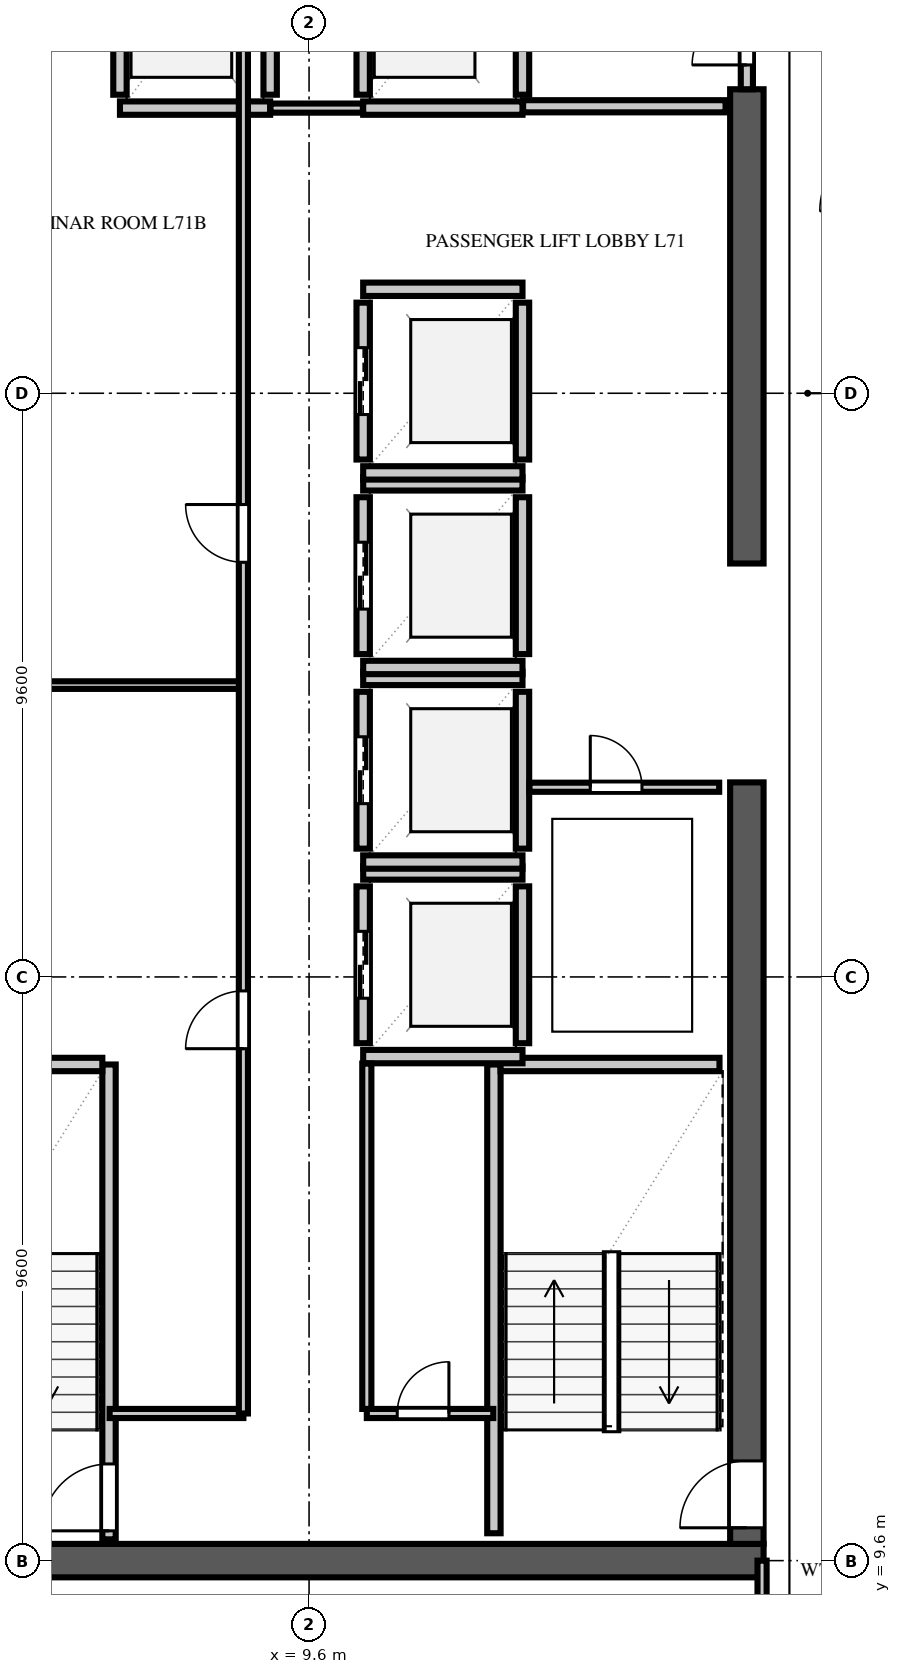
"""IFC4 building model, lengths in metres.
Left out: names, types, materials, properties, quantities, classifications, styles, units other than length and angle.
Written with IfcOpenShell. Run it as: python <this file> out.ifc"""

import sys

from ifc_helpers import new_model, si_unit, direction, frame, frame_2d, origin, place, context, subcontext, project, spatial, rectangle, extrude, element, fill, save


model = new_model("IFC4")
c1 = context("Model", 3, precision=1e-05, world=origin(), true_north=direction((0.0, 1.0)))
c2 = subcontext(c1, "Body", "Model", "MODEL_VIEW")
j1 = project(units=[si_unit("LENGTHUNIT", "METRE"), si_unit("PLANEANGLEUNIT", "RADIAN")], contexts=[c1])
p1 = place(None, origin())
s1 = spatial("IfcSite", under=j1, at=p1, CompositionType="ELEMENT")
p2 = place(p1, origin())
s2 = spatial("IfcBuilding", under=s1, at=p2, CompositionType="ELEMENT")
p3 = place(p2, frame((0.0, 0.0, 281.0)))
s3 = spatial("IfcBuildingStorey", under=s2, at=p3, CompositionType="ELEMENT", Elevation=281.0)
p4 = place(p3, frame((2.475, 9.6, 0.0), z_axis=(0.0, 0.0, 1.0), x_axis=(1.0, 0.0, 0.0)))
e1 = element("IfcWall", 1, at=p4, inside=s3, PredefinedType="SHEAR", context=c2, shape_type="SweptSolid", body=[
    extrude(rectangle(XDim=14.6, YDim=0.55, at=frame_2d((7.3, 0.0))), origin(), (0.0, 0.0, 1.0), 3.54),
])
p5 = place(p3, frame((16.8, 9.875, 0.0), z_axis=(0.0, 0.0, 1.0), x_axis=(0.0, 1.0, 0.0)))
e2 = element("IfcWall", 2, at=p5, inside=s3, PredefinedType="SHEAR", context=c2, shape_type="SweptSolid", body=[
    extrude(rectangle(XDim=12.525, YDim=0.55, at=frame_2d((6.262, 0.0))), origin(), (0.0, 0.0, 1.0), 3.54),
])
p6 = place(p5, frame((0.265, 0.0, 0.0)))
e3 = element("IfcOpeningElement", 3, at=p6, cuts=e2, PredefinedType="OPENING", context=c2, shape_type="SweptSolid", body=[
    extrude(rectangle(XDim=1.1, YDim=2.2, at=frame_2d((0.55, 1.1))), frame((0.0, 0.287, 0.0), z_axis=(0.0, -1.0, 0.0), x_axis=(1.0, 0.0, 0.0)), (0.0, 0.0, 1.0), 0.574),
])
p7 = place(p3, frame((16.8, 26.0, 0.0), z_axis=(0.0, 0.0, 1.0), x_axis=(0.0, 1.0, 0.0)))
e4 = element("IfcWall", 4, at=p7, inside=s3, PredefinedType="SHEAR", context=c2, shape_type="SweptSolid", body=[
    extrude(rectangle(XDim=7.8, YDim=0.55, at=frame_2d((3.9, 0.0))), origin(), (0.0, 0.0, 1.0), 3.54),
])
p8 = place(p3, frame((6.31, 9.95, 0.0), z_axis=(0.0, 0.0, 1.0), x_axis=(0.0, 1.0, 0.0)))
e5 = element("IfcWall", 5, at=p8, inside=s3, PredefinedType="SOLIDWALL", context=c2, shape_type="SweptSolid", body=[
    extrude(rectangle(XDim=7.81, YDim=0.22, at=frame_2d((3.905, 0.0))), origin(), (0.0, 0.0, 1.0), 3.54),
])
p9 = place(p8, frame((0.14, 0.0, 0.0)))
e6 = element("IfcOpeningElement", 6, at=p9, cuts=e5, PredefinedType="OPENING", context=c2, shape_type="SweptSolid", body=[
    extrude(rectangle(XDim=1.1, YDim=2.2, at=frame_2d((0.55, 1.1))), frame((0.0, 0.122, 0.0), z_axis=(0.0, -1.0, 0.0), x_axis=(1.0, 0.0, 0.0)), (0.0, 0.0, 1.0), 0.244),
])
p10 = place(p3, frame((2.65, 17.76, 0.0), z_axis=(0.0, 0.0, 1.0), x_axis=(1.0, 0.0, 0.0)))
e7 = element("IfcWall", 7, at=p10, inside=s3, PredefinedType="SOLIDWALL", context=c2, shape_type="SweptSolid", body=[
    extrude(rectangle(XDim=3.55, YDim=0.22, at=frame_2d((1.775, 0.0))), origin(), (0.0, 0.0, 1.0), 3.54),
])
p11 = place(p3, frame((12.64, 10.05, 0.0), z_axis=(0.0, 0.0, 1.0), x_axis=(0.0, 1.0, 0.0)))
e8 = element("IfcWall", 8, at=p11, inside=s3, PredefinedType="SOLIDWALL", context=c2, shape_type="SweptSolid", body=[
    extrude(rectangle(XDim=7.71, YDim=0.22, at=frame_2d((3.855, 0.0))), origin(), (0.0, 0.0, 1.0), 3.54),
])
p12 = place(p3, frame((12.75, 17.76, 0.0), z_axis=(0.0, 0.0, 1.0), x_axis=(1.0, 0.0, 0.0)))
e9 = element("IfcWall", 9, at=p12, inside=s3, PredefinedType="SOLIDWALL", context=c2, shape_type="SweptSolid", body=[
    extrude(rectangle(XDim=3.6, YDim=0.22, at=frame_2d((1.8, 0.0))), origin(), (0.0, 0.0, 1.0), 3.54),
])
p13 = place(p3, frame((10.49, 18.11, 0.0), z_axis=(0.0, 0.0, 1.0), x_axis=(0.0, 1.0, 0.0)))
e10 = element("IfcWall", 10, at=p13, inside=s3, PredefinedType="SOLIDWALL", context=c2, shape_type="SweptSolid", body=[
    extrude(rectangle(XDim=2.58, YDim=0.22, at=frame_2d((1.29, 0.0))), origin(), (0.0, 0.0, 1.0), 3.54),
])
p14 = place(p13, frame((0.74, 0.0, 0.0)))
e11 = element("IfcOpeningElement", 11, at=p14, cuts=e10, PredefinedType="OPENING", context=c2, shape_type="SweptSolid", body=[
    extrude(rectangle(XDim=1.1, YDim=2.2, at=frame_2d((0.55, 1.1))), frame((0.0, 0.122, 0.0), z_axis=(0.0, -1.0, 0.0), x_axis=(1.0, 0.0, 0.0)), (0.0, 0.0, 1.0), 0.244),
])
p15 = place(p3, frame((13.11, 18.11, 0.0), z_axis=(0.0, 0.0, 1.0), x_axis=(0.0, 1.0, 0.0)))
e12 = element("IfcWall", 12, at=p15, inside=s3, PredefinedType="SOLIDWALL", context=c2, shape_type="SweptSolid", body=[
    extrude(rectangle(XDim=2.58, YDim=0.22, at=frame_2d((1.29, 0.0))), origin(), (0.0, 0.0, 1.0), 3.54),
])
for number, where, z_axis, x_axis in (
    (13, (10.49, 17.89, 0.0), (0.0, 0.0, 1.0), (1.0, 0.0, 0.0)),
    (14, (10.49, 20.91, 0.0), (0.0, 0.0, 1.0), (1.0, 0.0, 0.0)),
):
    element("IfcWall", number, at=place(p3, frame(where, z_axis=z_axis, x_axis=x_axis)), inside=s3, PredefinedType="SOLIDWALL", context=c2, shape_type="SweptSolid", body=[
        extrude(rectangle(XDim=2.62, YDim=0.22, at=frame_2d((1.31, 0.0))), origin(), (0.0, 0.0, 1.0), 3.54),
    ])
p16 = place(p3, frame((10.49, 21.31, 0.0), z_axis=(0.0, 0.0, 1.0), x_axis=(0.0, 1.0, 0.0)))
e15 = element("IfcWall", 15, at=p16, inside=s3, PredefinedType="SOLIDWALL", context=c2, shape_type="SweptSolid", body=[
    extrude(rectangle(XDim=2.58, YDim=0.22, at=frame_2d((1.29, 0.0))), origin(), (0.0, 0.0, 1.0), 3.54),
])
p17 = place(p16, frame((0.74, 0.0, 0.0)))
e16 = element("IfcOpeningElement", 16, at=p17, cuts=e15, PredefinedType="OPENING", context=c2, shape_type="SweptSolid", body=[
    extrude(rectangle(XDim=1.1, YDim=2.2, at=frame_2d((0.55, 1.1))), frame((0.0, 0.122, 0.0), z_axis=(0.0, -1.0, 0.0), x_axis=(1.0, 0.0, 0.0)), (0.0, 0.0, 1.0), 0.244),
])
p18 = place(p3, frame((13.11, 21.31, 0.0), z_axis=(0.0, 0.0, 1.0), x_axis=(0.0, 1.0, 0.0)))
e17 = element("IfcWall", 17, at=p18, inside=s3, PredefinedType="SOLIDWALL", context=c2, shape_type="SweptSolid", body=[
    extrude(rectangle(XDim=2.58, YDim=0.22, at=frame_2d((1.29, 0.0))), origin(), (0.0, 0.0, 1.0), 3.54),
])
for number, where, z_axis, x_axis in (
    (18, (10.49, 21.09, 0.0), (0.0, 0.0, 1.0), (1.0, 0.0, 0.0)),
    (19, (10.49, 24.11, 0.0), (0.0, 0.0, 1.0), (1.0, 0.0, 0.0)),
):
    element("IfcWall", number, at=place(p3, frame(where, z_axis=z_axis, x_axis=x_axis)), inside=s3, PredefinedType="SOLIDWALL", context=c2, shape_type="SweptSolid", body=[
        extrude(rectangle(XDim=2.62, YDim=0.22, at=frame_2d((1.31, 0.0))), origin(), (0.0, 0.0, 1.0), 3.54),
    ])
p19 = place(p3, frame((10.49, 24.51, 0.0), z_axis=(0.0, 0.0, 1.0), x_axis=(0.0, 1.0, 0.0)))
e20 = element("IfcWall", 20, at=p19, inside=s3, PredefinedType="SOLIDWALL", context=c2, shape_type="SweptSolid", body=[
    extrude(rectangle(XDim=2.58, YDim=0.22, at=frame_2d((1.29, 0.0))), origin(), (0.0, 0.0, 1.0), 3.54),
])
p20 = place(p19, frame((0.74, 0.0, 0.0)))
e21 = element("IfcOpeningElement", 21, at=p20, cuts=e20, PredefinedType="OPENING", context=c2, shape_type="SweptSolid", body=[
    extrude(rectangle(XDim=1.1, YDim=2.2, at=frame_2d((0.55, 1.1))), frame((0.0, 0.122, 0.0), z_axis=(0.0, -1.0, 0.0), x_axis=(1.0, 0.0, 0.0)), (0.0, 0.0, 1.0), 0.244),
])
p21 = place(p3, frame((13.11, 24.51, 0.0), z_axis=(0.0, 0.0, 1.0), x_axis=(0.0, 1.0, 0.0)))
e22 = element("IfcWall", 22, at=p21, inside=s3, PredefinedType="SOLIDWALL", context=c2, shape_type="SweptSolid", body=[
    extrude(rectangle(XDim=2.58, YDim=0.22, at=frame_2d((1.29, 0.0))), origin(), (0.0, 0.0, 1.0), 3.54),
])
for number, where, z_axis, x_axis in (
    (23, (10.49, 24.29, 0.0), (0.0, 0.0, 1.0), (1.0, 0.0, 0.0)),
    (24, (10.49, 27.31, 0.0), (0.0, 0.0, 1.0), (1.0, 0.0, 0.0)),
):
    element("IfcWall", number, at=place(p3, frame(where, z_axis=z_axis, x_axis=x_axis)), inside=s3, PredefinedType="SOLIDWALL", context=c2, shape_type="SweptSolid", body=[
        extrude(rectangle(XDim=2.62, YDim=0.22, at=frame_2d((1.31, 0.0))), origin(), (0.0, 0.0, 1.0), 3.54),
    ])
p22 = place(p3, frame((10.49, 27.71, 0.0), z_axis=(0.0, 0.0, 1.0), x_axis=(0.0, 1.0, 0.0)))
e25 = element("IfcWall", 25, at=p22, inside=s3, PredefinedType="SOLIDWALL", context=c2, shape_type="SweptSolid", body=[
    extrude(rectangle(XDim=2.58, YDim=0.22, at=frame_2d((1.29, 0.0))), origin(), (0.0, 0.0, 1.0), 3.54),
])
p23 = place(p22, frame((0.74, 0.0, 0.0)))
e26 = element("IfcOpeningElement", 26, at=p23, cuts=e25, PredefinedType="OPENING", context=c2, shape_type="SweptSolid", body=[
    extrude(rectangle(XDim=1.1, YDim=2.2, at=frame_2d((0.55, 1.1))), frame((0.0, 0.122, 0.0), z_axis=(0.0, -1.0, 0.0), x_axis=(1.0, 0.0, 0.0)), (0.0, 0.0, 1.0), 0.244),
])
p24 = place(p3, frame((13.11, 27.71, 0.0), z_axis=(0.0, 0.0, 1.0), x_axis=(0.0, 1.0, 0.0)))
e27 = element("IfcWall", 27, at=p24, inside=s3, PredefinedType="SOLIDWALL", context=c2, shape_type="SweptSolid", body=[
    extrude(rectangle(XDim=2.58, YDim=0.22, at=frame_2d((1.29, 0.0))), origin(), (0.0, 0.0, 1.0), 3.54),
])
for number, where, z_axis, x_axis in (
    (28, (10.49, 27.49, 0.0), (0.0, 0.0, 1.0), (1.0, 0.0, 0.0)),
    (29, (10.49, 30.51, 0.0), (0.0, 0.0, 1.0), (1.0, 0.0, 0.0)),
):
    element("IfcWall", number, at=place(p3, frame(where, z_axis=z_axis, x_axis=x_axis)), inside=s3, PredefinedType="SOLIDWALL", context=c2, shape_type="SweptSolid", body=[
        extrude(rectangle(XDim=2.62, YDim=0.22, at=frame_2d((1.31, 0.0))), origin(), (0.0, 0.0, 1.0), 3.54),
    ])
for number, where, z_axis, x_axis in (
    (30, (6.49, 33.71, 0.0), (0.0, 0.0, 1.0), (0.0, 1.0, 0.0)),
    (31, (8.96, 33.71, 0.0), (0.0, 0.0, 1.0), (0.0, 1.0, 0.0)),
):
    element("IfcWall", number, at=place(p3, frame(where, z_axis=z_axis, x_axis=x_axis)), inside=s3, PredefinedType="SOLIDWALL", context=c2, shape_type="SweptSolid", body=[
        extrude(rectangle(XDim=2.78, YDim=0.22, at=frame_2d((1.39, 0.0))), origin(), (0.0, 0.0, 1.0), 3.54),
    ])
p25 = place(p3, frame((6.49, 33.49, 0.0), z_axis=(0.0, 0.0, 1.0), x_axis=(1.0, 0.0, 0.0)))
e32 = element("IfcWall", 32, at=p25, inside=s3, PredefinedType="SOLIDWALL", context=c2, shape_type="SweptSolid", body=[
    extrude(rectangle(XDim=2.47, YDim=0.22, at=frame_2d((1.235, 0.0))), origin(), (0.0, 0.0, 1.0), 3.54),
])
for number, where, z_axis, x_axis in (
    (33, (10.49, 33.71, 0.0), (0.0, 0.0, 1.0), (0.0, 1.0, 0.0)),
    (34, (13.11, 33.71, 0.0), (0.0, 0.0, 1.0), (0.0, 1.0, 0.0)),
):
    element("IfcWall", number, at=place(p3, frame(where, z_axis=z_axis, x_axis=x_axis)), inside=s3, PredefinedType="SOLIDWALL", context=c2, shape_type="SweptSolid", body=[
        extrude(rectangle(XDim=2.78, YDim=0.22, at=frame_2d((1.39, 0.0))), origin(), (0.0, 0.0, 1.0), 3.54),
    ])
p26 = place(p3, frame((10.49, 33.49, 0.0), z_axis=(0.0, 0.0, 1.0), x_axis=(1.0, 0.0, 0.0)))
e35 = element("IfcWall", 35, at=p26, inside=s3, PredefinedType="SOLIDWALL", context=c2, shape_type="SweptSolid", body=[
    extrude(rectangle(XDim=2.62, YDim=0.22, at=frame_2d((1.31, 0.0))), origin(), (0.0, 0.0, 1.0), 3.54),
])
p27 = place(p3, frame((13.12, 33.52, 0.0), z_axis=(0.0, 0.0, 1.0), x_axis=(1.0, 0.0, 0.0)))
e36 = element("IfcWall", 36, at=p27, inside=s3, PredefinedType="SOLIDWALL", context=c2, shape_type="SweptSolid", body=[
    extrude(rectangle(XDim=3.33, YDim=0.2, at=frame_2d((1.665, 0.0))), origin(), (0.0, 0.0, 1.0), 3.54),
])
p28 = place(p3, frame((16.8, 33.8, 0.0), z_axis=(0.0, 0.0, 1.0), x_axis=(0.0, 1.0, 0.0)))
e37 = element("IfcWall", 37, at=p28, inside=s3, PredefinedType="SOLIDWALL", context=c2, shape_type="SweptSolid", body=[
    extrude(rectangle(XDim=2.6, YDim=0.2, at=frame_2d((1.3, 0.0))), origin(), (0.0, 0.0, 1.0), 3.54),
])
p29 = place(p28, frame((0.4, 0.0, 0.0)))
e38 = element("IfcOpeningElement", 38, at=p29, cuts=e37, PredefinedType="OPENING", context=c2, shape_type="SweptSolid", body=[
    extrude(rectangle(XDim=1.8, YDim=2.2, at=frame_2d((0.9, 1.1))), frame((0.0, 0.112, 0.0), z_axis=(0.0, -1.0, 0.0), x_axis=(1.0, 0.0, 0.0)), (0.0, 0.0, 1.0), 0.224),
])
p30 = place(p3, frame((8.965, 33.49, 0.0), z_axis=(0.0, 0.0, 1.0), x_axis=(1.0, 0.0, 0.0)))
e39 = element("IfcWall", 39, at=p30, inside=s3, PredefinedType="PARTITIONING", context=c2, shape_type="SweptSolid", body=[
    extrude(rectangle(XDim=1.52, YDim=0.15, at=frame_2d((0.76, 0.0))), origin(), (0.0, 0.0, 1.0), 3.54),
])
p31 = place(p3, frame((10.55, 12.02, 0.0), z_axis=(0.0, 0.0, 1.0), x_axis=(1.0, 0.0, 0.0)))
e40 = element("IfcWall", 40, at=p31, inside=s3, PredefinedType="PARTITIONING", context=c2, shape_type="SweptSolid", body=[
    extrude(rectangle(XDim=2.08, YDim=0.15, at=frame_2d((1.04, 0.0))), origin(), (0.0, 0.0, 1.0), 3.54),
])
p32 = place(p31, frame((0.5, 0.0, 0.0)))
e41 = element("IfcOpeningElement", 41, at=p32, cuts=e40, PredefinedType="OPENING", context=c2, shape_type="SweptSolid", body=[
    extrude(rectangle(XDim=0.85, YDim=2.1, at=frame_2d((0.425, 1.05))), frame((0.0, 0.087, 0.0), z_axis=(0.0, -1.0, 0.0), x_axis=(1.0, 0.0, 0.0)), (0.0, 0.0, 1.0), 0.174),
])
p33 = place(p3, frame((10.55, 12.095, 0.0), z_axis=(0.0, 0.0, 1.0), x_axis=(0.0, 1.0, 0.0)))
e42 = element("IfcWall", 42, at=p33, inside=s3, PredefinedType="PARTITIONING", context=c2, shape_type="SweptSolid", body=[
    extrude(rectangle(XDim=5.68, YDim=0.15, at=frame_2d((2.84, 0.0))), origin(), (0.0, 0.0, 1.0), 3.54),
])
p34 = place(p3, frame((13.225, 22.32, 0.0), z_axis=(0.0, 0.0, 1.0), x_axis=(1.0, 0.0, 0.0)))
e43 = element("IfcWall", 43, at=p34, inside=s3, PredefinedType="PARTITIONING", context=c2, shape_type="SweptSolid", body=[
    extrude(rectangle(XDim=3.12, YDim=0.15, at=frame_2d((1.56, 0.0))), origin(), (0.0, 0.0, 1.0), 3.54),
])
p35 = place(p34, frame((1.0, 0.0, 0.0)))
e44 = element("IfcOpeningElement", 44, at=p35, cuts=e43, PredefinedType="OPENING", context=c2, shape_type="SweptSolid", body=[
    extrude(rectangle(XDim=0.85, YDim=2.1, at=frame_2d((0.425, 1.05))), frame((0.0, 0.087, 0.0), z_axis=(0.0, -1.0, 0.0), x_axis=(1.0, 0.0, 0.0)), (0.0, 0.0, 1.0), 0.174),
])
p36 = place(p3, frame((6.32, 12.02, 0.0), z_axis=(0.0, 0.0, 1.0), x_axis=(1.0, 0.0, 0.0)))
e45 = element("IfcWall", 45, at=p36, inside=s3, PredefinedType="PARTITIONING", context=c2, shape_type="SweptSolid", body=[
    extrude(rectangle(XDim=2.2, YDim=0.15, at=frame_2d((1.1, 0.0))), origin(), (0.0, 0.0, 1.0), 3.54),
])
p37 = place(p3, frame((2.65, 24.0, 0.0), z_axis=(0.0, 0.0, 1.0), x_axis=(1.0, 0.0, 0.0)))
e46 = element("IfcWall", 46, at=p37, inside=s3, PredefinedType="PARTITIONING", context=c2, shape_type="SweptSolid", body=[
    extrude(rectangle(XDim=5.87, YDim=0.125, at=frame_2d((2.935, 0.0))), origin(), (0.0, 0.0, 1.0), 3.54),
])
p38 = place(p3, frame((8.52, 12.02, 0.0), z_axis=(0.0, 0.0, 1.0), x_axis=(0.0, 1.0, 0.0)))
e47 = element("IfcWall", 47, at=p38, inside=s3, PredefinedType="PARTITIONING", context=c2, shape_type="SweptSolid", body=[
    extrude(rectangle(XDim=24.76, YDim=0.15, at=frame_2d((12.38, 0.0))), origin(), (0.0, 0.0, 1.0), 3.54),
])
p39 = place(p38, frame((6.0, 0.0, 0.0)))
e48 = element("IfcOpeningElement", 48, at=p39, cuts=e47, PredefinedType="OPENING", context=c2, shape_type="SweptSolid", body=[
    extrude(rectangle(XDim=0.95, YDim=2.15, at=frame_2d((0.475, 1.075))), frame((0.0, 0.087, 0.0), z_axis=(0.0, -1.0, 0.0), x_axis=(1.0, 0.0, 0.0)), (0.0, 0.0, 1.0), 0.174),
])
p40 = place(p38, frame((14.0, 0.0, 0.0)))
e49 = element("IfcOpeningElement", 49, at=p40, cuts=e47, PredefinedType="OPENING", context=c2, shape_type="SweptSolid", body=[
    extrude(rectangle(XDim=0.95, YDim=2.15, at=frame_2d((0.475, 1.075))), frame((0.0, 0.087, 0.0), z_axis=(0.0, -1.0, 0.0), x_axis=(1.0, 0.0, 0.0)), (0.0, 0.0, 1.0), 0.174),
])
p41 = place(p3, frame((17.05, 0.22, 0.0), z_axis=(0.0, 0.0, 1.0), x_axis=(0.0, 1.0, 0.0)))
e50 = element("IfcWall", 50, at=p41, inside=s3, PredefinedType="PARTITIONING", context=c2, shape_type="SweptSolid", body=[
    extrude(rectangle(XDim=9.38, YDim=0.15, at=frame_2d((4.69, 0.0))), origin(), (0.0, 0.0, 1.0), 3.54),
])
p42 = place(p41, frame((5.58, 0.0, 0.0)))
e51 = element("IfcOpeningElement", 51, at=p42, cuts=e50, PredefinedType="OPENING", context=c2, shape_type="SweptSolid", body=[
    extrude(rectangle(XDim=1.0, YDim=2.2, at=frame_2d((0.5, 1.1))), frame((0.0, 0.087, 0.0), z_axis=(0.0, -1.0, 0.0), x_axis=(1.0, 0.0, 0.0)), (0.0, 0.0, 1.0), 0.174),
])
p43 = place(p9, origin())
e52 = element("IfcDoor", 52, at=p43, inside=s3, OperationType="SINGLE_SWING_LEFT", PredefinedType="DOOR", context=c2, shape_type="SweptSolid", body=[
    extrude(rectangle(XDim=1.1, YDim=2.2, at=frame_2d((0.55, 1.1))), frame((0.0, 0.025, 0.0), z_axis=(0.0, -1.0, 0.0), x_axis=(1.0, 0.0, 0.0)), (0.0, 0.0, 1.0), 0.05),
])
fill(e6, e52)
p44 = place(p6, origin())
e53 = element("IfcDoor", 53, at=p44, inside=s3, OperationType="SINGLE_SWING_LEFT", PredefinedType="DOOR", context=c2, shape_type="SweptSolid", body=[
    extrude(rectangle(XDim=1.1, YDim=2.2, at=frame_2d((0.55, 1.1))), frame((0.0, 0.025, 0.0), z_axis=(0.0, -1.0, 0.0), x_axis=(1.0, 0.0, 0.0)), (0.0, 0.0, 1.0), 0.05),
])
fill(e3, e53)
p45 = place(p14, origin())
e54 = element("IfcDoor", 54, at=p45, inside=s3, OperationType="DOUBLE_DOOR_SLIDING", PredefinedType="DOOR", context=c2, shape_type="SweptSolid", body=[
    extrude(rectangle(XDim=1.1, YDim=2.2, at=frame_2d((0.55, 1.1))), frame((0.0, 0.025, 0.0), z_axis=(0.0, -1.0, 0.0), x_axis=(1.0, 0.0, 0.0)), (0.0, 0.0, 1.0), 0.05),
])
fill(e11, e54)
p46 = place(p17, origin())
e55 = element("IfcDoor", 55, at=p46, inside=s3, OperationType="DOUBLE_DOOR_SLIDING", PredefinedType="DOOR", context=c2, shape_type="SweptSolid", body=[
    extrude(rectangle(XDim=1.1, YDim=2.2, at=frame_2d((0.55, 1.1))), frame((0.0, 0.025, 0.0), z_axis=(0.0, -1.0, 0.0), x_axis=(1.0, 0.0, 0.0)), (0.0, 0.0, 1.0), 0.05),
])
fill(e16, e55)
p47 = place(p20, origin())
e56 = element("IfcDoor", 56, at=p47, inside=s3, OperationType="DOUBLE_DOOR_SLIDING", PredefinedType="DOOR", context=c2, shape_type="SweptSolid", body=[
    extrude(rectangle(XDim=1.1, YDim=2.2, at=frame_2d((0.55, 1.1))), frame((0.0, 0.025, 0.0), z_axis=(0.0, -1.0, 0.0), x_axis=(1.0, 0.0, 0.0)), (0.0, 0.0, 1.0), 0.05),
])
fill(e21, e56)
p48 = place(p23, origin())
e57 = element("IfcDoor", 57, at=p48, inside=s3, OperationType="DOUBLE_DOOR_SLIDING", PredefinedType="DOOR", context=c2, shape_type="SweptSolid", body=[
    extrude(rectangle(XDim=1.1, YDim=2.2, at=frame_2d((0.55, 1.1))), frame((0.0, 0.025, 0.0), z_axis=(0.0, -1.0, 0.0), x_axis=(1.0, 0.0, 0.0)), (0.0, 0.0, 1.0), 0.05),
])
fill(e26, e57)
p49 = place(p29, origin())
e58 = element("IfcDoor", 58, at=p49, inside=s3, OperationType="DOUBLE_DOOR_SINGLE_SWING", PredefinedType="DOOR", context=c2, shape_type="SweptSolid", body=[
    extrude(rectangle(XDim=1.8, YDim=2.2, at=frame_2d((0.9, 1.1))), frame((0.0, 0.025, 0.0), z_axis=(0.0, -1.0, 0.0), x_axis=(1.0, 0.0, 0.0)), (0.0, 0.0, 1.0), 0.05),
])
fill(e38, e58)
p50 = place(p32, origin())
e59 = element("IfcDoor", 59, at=p50, inside=s3, OperationType="SINGLE_SWING_RIGHT", PredefinedType="DOOR", context=c2, shape_type="SweptSolid", body=[
    extrude(rectangle(XDim=0.85, YDim=2.1, at=frame_2d((0.425, 1.05))), frame((0.0, 0.025, 0.0), z_axis=(0.0, -1.0, 0.0), x_axis=(1.0, 0.0, 0.0)), (0.0, 0.0, 1.0), 0.05),
])
fill(e41, e59)
p51 = place(p35, origin())
e60 = element("IfcDoor", 60, at=p51, inside=s3, OperationType="SINGLE_SWING_LEFT", PredefinedType="DOOR", context=c2, shape_type="SweptSolid", body=[
    extrude(rectangle(XDim=0.85, YDim=2.1, at=frame_2d((0.425, 1.05))), frame((0.0, 0.025, 0.0), z_axis=(0.0, -1.0, 0.0), x_axis=(1.0, 0.0, 0.0)), (0.0, 0.0, 1.0), 0.05),
])
fill(e44, e60)
p52 = place(p39, origin())
e61 = element("IfcDoor", 61, at=p52, inside=s3, OperationType="SINGLE_SWING_LEFT", PredefinedType="DOOR", context=c2, shape_type="SweptSolid", body=[
    extrude(rectangle(XDim=0.95, YDim=2.15, at=frame_2d((0.475, 1.075))), frame((0.0, 0.025, 0.0), z_axis=(0.0, -1.0, 0.0), x_axis=(1.0, 0.0, 0.0)), (0.0, 0.0, 1.0), 0.05),
])
fill(e48, e61)
p53 = place(p40, origin())
e62 = element("IfcDoor", 62, at=p53, inside=s3, OperationType="SINGLE_SWING_RIGHT", PredefinedType="DOOR", context=c2, shape_type="SweptSolid", body=[
    extrude(rectangle(XDim=0.95, YDim=2.15, at=frame_2d((0.475, 1.075))), frame((0.0, 0.025, 0.0), z_axis=(0.0, -1.0, 0.0), x_axis=(1.0, 0.0, 0.0)), (0.0, 0.0, 1.0), 0.05),
])
fill(e49, e62)
save(model, sys.argv[1])
